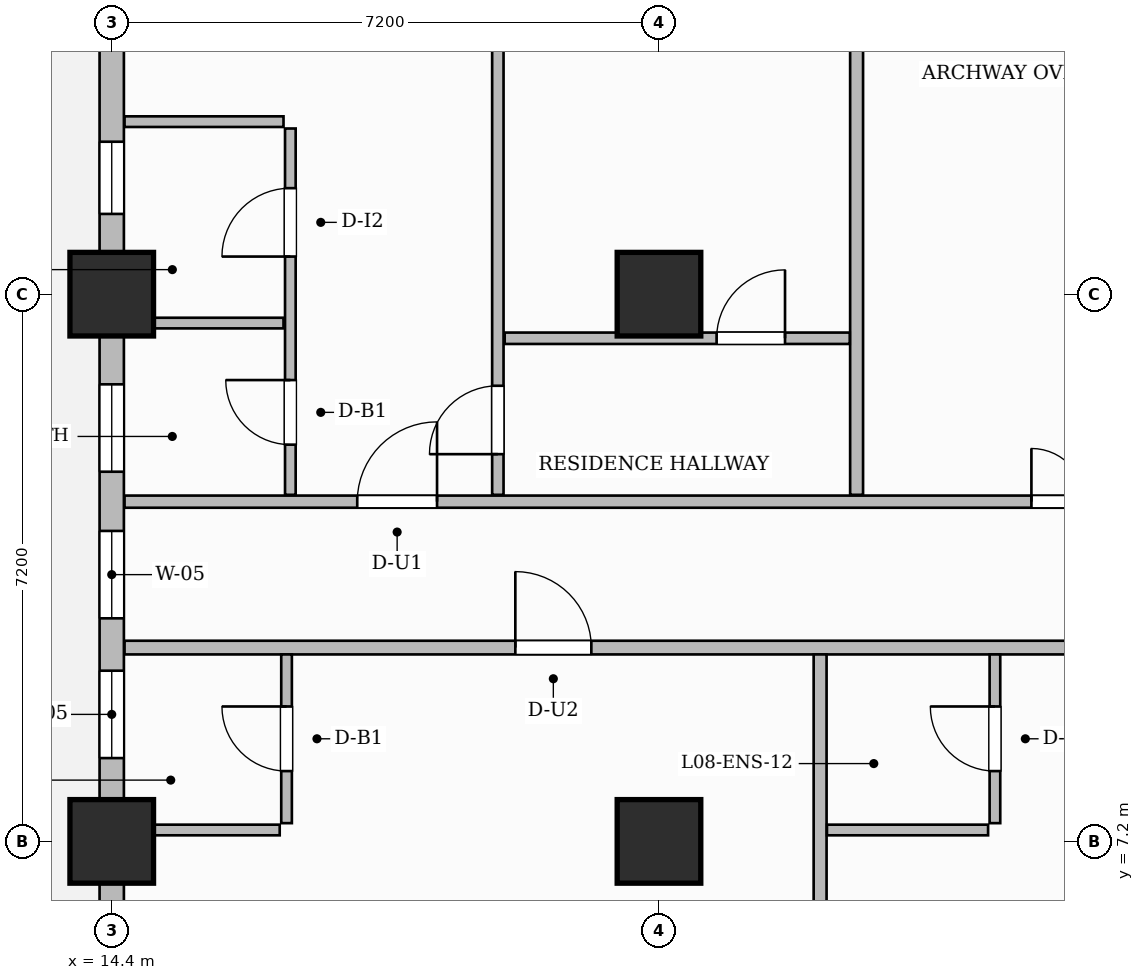
"""IFC4 building model, lengths in metres.
Left out: names, types, materials, properties, quantities, classifications, styles, units other than length and angle.
Written with IfcOpenShell. Run it as: python <this file> out.ifc"""

import sys

from ifc_helpers import new_model, si_unit, direction, frame, frame_2d, origin, origin_2d, place, context, subcontext, project, spatial, rectangle, extrude, source, transform, mapped, element, fill, save


model = new_model("IFC4")
c1 = context("Model", 3, precision=1e-05, world=origin(), true_north=direction((0.0, 1.0)))
c2 = subcontext(c1, "Body", "Model", "MODEL_VIEW")
j1 = project(units=[si_unit("LENGTHUNIT", "METRE"), si_unit("PLANEANGLEUNIT", "RADIAN")], contexts=[c1])
p1 = place(None, origin())
s1 = spatial("IfcSite", under=j1, at=p1, CompositionType="ELEMENT")
p2 = place(p1, origin())
s2 = spatial("IfcBuilding", under=s1, at=p2, CompositionType="ELEMENT")
p3 = place(p2, frame((0.0, 0.0, 39.8)))
s3 = spatial("IfcBuildingStorey", under=s2, at=p3, CompositionType="ELEMENT", Elevation=39.8)
m1 = source(origin(), c2, "Body", "SweptSolid", [
    extrude(rectangle(XDim=1.1, YDim=1.1, at=origin_2d()), origin(), (0.0, 0.0, 1.0), 3.7),
])
for number, where, z_axis, x_axis in (
    (1, (14.4, 7.2, 0.0), (0.0, 0.0, 1.0), (1.0, 0.0, 0.0)),
    (2, (14.4, 14.4, 0.0), (0.0, 0.0, 1.0), (1.0, 0.0, 0.0)),
    (3, (21.6, 7.2, 0.0), (0.0, 0.0, 1.0), (1.0, 0.0, 0.0)),
    (4, (21.6, 14.4, 0.0), (0.0, 0.0, 1.0), (1.0, 0.0, 0.0)),
):
    element("IfcColumn", number, at=place(p3, frame(where, z_axis=z_axis, x_axis=x_axis)), inside=s3, PredefinedType="COLUMN", context=c2, shape_type="MappedRepresentation", body=[
        mapped(m1, transform((0.0, 0.0, 0.0), scale=1.0)),
    ])
p4 = place(p3, frame((14.568, 9.75, 0.0), z_axis=(0.0, 0.0, 1.0), x_axis=(1.0, 0.0, 0.0)))
e5 = element("IfcWall", 5, at=p4, inside=s3, PredefinedType="PARTITIONING", context=c2, shape_type="SweptSolid", body=[
    extrude(rectangle(XDim=15.542, YDim=0.18, at=frame_2d((7.771, 0.0))), origin(), (0.0, 0.0, 1.0), 3.45),
])
p5 = place(p4, frame((5.142, 0.0, 0.0)))
e6 = element("IfcOpeningElement", 6, at=p5, cuts=e5, PredefinedType="OPENING", context=c2, shape_type="SweptSolid", body=[
    extrude(rectangle(XDim=1.0, YDim=2.2, at=frame_2d((0.5, 1.1))), frame((0.0, 0.1, 0.0), z_axis=(0.0, -1.0, 0.0), x_axis=(1.0, 0.0, 0.0)), (0.0, 0.0, 1.0), 0.2),
])
p6 = place(p4, frame((13.017, 0.0, 0.0)))
e7 = element("IfcOpeningElement", 7, at=p6, cuts=e5, PredefinedType="OPENING", context=c2, shape_type="SweptSolid", body=[
    extrude(rectangle(XDim=1.05, YDim=2.25, at=frame_2d((0.525, 1.125))), frame((0.0, 0.1, 0.0), z_axis=(0.0, -1.0, 0.0), x_axis=(1.0, 0.0, 0.0)), (0.0, 0.0, 1.0), 0.2),
])
p7 = place(p3, frame((14.568, 11.67, 0.0), z_axis=(0.0, 0.0, 1.0), x_axis=(1.0, 0.0, 0.0)))
e8 = element("IfcWall", 8, at=p7, inside=s3, PredefinedType="PARTITIONING", context=c2, shape_type="SweptSolid", body=[
    extrude(rectangle(XDim=15.542, YDim=0.16, at=frame_2d((7.771, 0.0))), origin(), (0.0, 0.0, 1.0), 3.45),
])
p8 = place(p7, frame((3.062, 0.0, 0.0)))
e9 = element("IfcOpeningElement", 9, at=p8, cuts=e8, PredefinedType="OPENING", context=c2, shape_type="SweptSolid", body=[
    extrude(rectangle(XDim=1.05, YDim=2.25, at=frame_2d((0.525, 1.125))), frame((0.0, 0.09, 0.0), z_axis=(0.0, -1.0, 0.0), x_axis=(1.0, 0.0, 0.0)), (0.0, 0.0, 1.0), 0.18),
])
p9 = place(p7, frame((11.932, 0.0, 0.0)))
e10 = element("IfcOpeningElement", 10, at=p9, cuts=e8, PredefinedType="OPENING", context=c2, shape_type="SweptSolid", body=[
    extrude(rectangle(XDim=1.4, YDim=2.35, at=frame_2d((0.7, 1.175))), frame((0.0, 0.09, 0.0), z_axis=(0.0, -1.0, 0.0), x_axis=(1.0, 0.0, 0.0)), (0.0, 0.0, 1.0), 0.18),
])
p10 = place(p3, frame((23.72, 0.168, 0.0), z_axis=(0.0, 0.0, 1.0), x_axis=(0.0, 1.0, 0.0)))
e11 = element("IfcWall", 11, at=p10, inside=s3, PredefinedType="PARTITIONING", context=c2, shape_type="SweptSolid", body=[
    extrude(rectangle(XDim=9.492, YDim=0.17, at=frame_2d((4.746, 0.0))), origin(), (0.0, 0.0, 1.0), 3.45),
])
p11 = place(p3, frame((16.7, 7.44, 0.0), z_axis=(0.0, 0.0, 1.0), x_axis=(0.0, 1.0, 0.0)))
e12 = element("IfcWall", 12, at=p11, inside=s3, PredefinedType="PARTITIONING", context=c2, shape_type="SweptSolid", body=[
    extrude(rectangle(XDim=2.22, YDim=0.14, at=frame_2d((1.11, 0.0))), origin(), (0.0, 0.0, 1.0), 3.45),
])
p12 = place(p11, frame((0.685, 0.0, 0.0)))
e13 = element("IfcOpeningElement", 13, at=p12, cuts=e12, PredefinedType="OPENING", context=c2, shape_type="SweptSolid", body=[
    extrude(rectangle(XDim=0.85, YDim=2.1, at=frame_2d((0.425, 1.05))), frame((0.0, 0.08, 0.0), z_axis=(0.0, -1.0, 0.0), x_axis=(1.0, 0.0, 0.0)), (0.0, 0.0, 1.0), 0.16),
])
p13 = place(p3, frame((14.49, 7.35, 0.0), z_axis=(0.0, 0.0, 1.0), x_axis=(1.0, 0.0, 0.0)))
e14 = element("IfcWall", 14, at=p13, inside=s3, PredefinedType="PARTITIONING", context=c2, shape_type="SweptSolid", body=[
    extrude(rectangle(XDim=2.12, YDim=0.14, at=frame_2d((1.06, 0.0))), origin(), (0.0, 0.0, 1.0), 2.885),
])
p14 = place(p3, frame((26.02, 7.44, 0.0), z_axis=(0.0, 0.0, 1.0), x_axis=(0.0, 1.0, 0.0)))
e15 = element("IfcWall", 15, at=p14, inside=s3, PredefinedType="PARTITIONING", context=c2, shape_type="SweptSolid", body=[
    extrude(rectangle(XDim=2.22, YDim=0.14, at=frame_2d((1.11, 0.0))), origin(), (0.0, 0.0, 1.0), 3.45),
])
p15 = place(p14, frame((0.685, 0.0, 0.0)))
e16 = element("IfcOpeningElement", 16, at=p15, cuts=e15, PredefinedType="OPENING", context=c2, shape_type="SweptSolid", body=[
    extrude(rectangle(XDim=0.85, YDim=2.1, at=frame_2d((0.425, 1.05))), frame((0.0, 0.08, 0.0), z_axis=(0.0, -1.0, 0.0), x_axis=(1.0, 0.0, 0.0)), (0.0, 0.0, 1.0), 0.16),
])
p16 = place(p3, frame((23.81, 7.35, 0.0), z_axis=(0.0, 0.0, 1.0), x_axis=(1.0, 0.0, 0.0)))
e17 = element("IfcWall", 17, at=p16, inside=s3, PredefinedType="PARTITIONING", context=c2, shape_type="SweptSolid", body=[
    extrude(rectangle(XDim=2.12, YDim=0.14, at=frame_2d((1.06, 0.0))), origin(), (0.0, 0.0, 1.0), 2.885),
])
p17 = place(p3, frame((24.2, 11.76, 0.0), z_axis=(0.0, 0.0, 1.0), x_axis=(0.0, 1.0, 0.0)))
e18 = element("IfcWall", 18, at=p17, inside=s3, PredefinedType="PARTITIONING", context=c2, shape_type="SweptSolid", body=[
    extrude(rectangle(XDim=9.672, YDim=0.17, at=frame_2d((4.836, 0.0))), origin(), (0.0, 0.0, 1.0), 3.45),
])
p18 = place(p3, frame((16.75, 11.76, 0.0), z_axis=(0.0, 0.0, 1.0), x_axis=(0.0, 1.0, 0.0)))
e19 = element("IfcWall", 19, at=p18, inside=s3, PredefinedType="PARTITIONING", context=c2, shape_type="SweptSolid", body=[
    extrude(rectangle(XDim=4.82, YDim=0.14, at=frame_2d((2.41, 0.0))), origin(), (0.0, 0.0, 1.0), 3.45),
])
p19 = place(p18, frame((0.66, 0.0, 0.0)))
e20 = element("IfcOpeningElement", 20, at=p19, cuts=e19, PredefinedType="OPENING", context=c2, shape_type="SweptSolid", body=[
    extrude(rectangle(XDim=0.85, YDim=2.1, at=frame_2d((0.425, 1.05))), frame((0.0, 0.08, 0.0), z_axis=(0.0, -1.0, 0.0), x_axis=(1.0, 0.0, 0.0)), (0.0, 0.0, 1.0), 0.16),
])
p20 = place(p18, frame((3.135, 0.0, 0.0)))
e21 = element("IfcOpeningElement", 21, at=p20, cuts=e19, PredefinedType="OPENING", context=c2, shape_type="SweptSolid", body=[
    extrude(rectangle(XDim=0.9, YDim=2.15, at=frame_2d((0.45, 1.075))), frame((0.0, 0.08, 0.0), z_axis=(0.0, -1.0, 0.0), x_axis=(1.0, 0.0, 0.0)), (0.0, 0.0, 1.0), 0.16),
])
p21 = place(p3, frame((14.59, 14.02, 0.0), z_axis=(0.0, 0.0, 1.0), x_axis=(1.0, 0.0, 0.0)))
e22 = element("IfcWall", 22, at=p21, inside=s3, PredefinedType="PARTITIONING", context=c2, shape_type="SweptSolid", body=[
    extrude(rectangle(XDim=2.07, YDim=0.14, at=frame_2d((1.035, 0.0))), origin(), (0.0, 0.0, 1.0), 3.45),
])
p22 = place(p3, frame((14.568, 16.67, 0.0), z_axis=(0.0, 0.0, 1.0), x_axis=(1.0, 0.0, 0.0)))
e23 = element("IfcWall", 23, at=p22, inside=s3, PredefinedType="PARTITIONING", context=c2, shape_type="SweptSolid", body=[
    extrude(rectangle(XDim=2.092, YDim=0.14, at=frame_2d((1.046, 0.0))), origin(), (0.0, 0.0, 1.0), 3.45),
])
p23 = place(p3, frame((19.48, 11.76, 0.0), z_axis=(0.0, 0.0, 1.0), x_axis=(0.0, 1.0, 0.0)))
e24 = element("IfcWall", 24, at=p23, inside=s3, PredefinedType="PARTITIONING", context=c2, shape_type="SweptSolid", body=[
    extrude(rectangle(XDim=9.672, YDim=0.15, at=frame_2d((4.836, 0.0))), origin(), (0.0, 0.0, 1.0), 3.45),
])
p24 = place(p23, frame((0.535, 0.0, 0.0)))
e25 = element("IfcOpeningElement", 25, at=p24, cuts=e24, PredefinedType="OPENING", context=c2, shape_type="SweptSolid", body=[
    extrude(rectangle(XDim=0.9, YDim=2.15, at=frame_2d((0.45, 1.075))), frame((0.0, 0.085, 0.0), z_axis=(0.0, -1.0, 0.0), x_axis=(1.0, 0.0, 0.0)), (0.0, 0.0, 1.0), 0.17),
])
p25 = place(p3, frame((19.57, 13.82, 0.0), z_axis=(0.0, 0.0, 1.0), x_axis=(1.0, 0.0, 0.0)))
e26 = element("IfcWall", 26, at=p25, inside=s3, PredefinedType="PARTITIONING", context=c2, shape_type="SweptSolid", body=[
    extrude(rectangle(XDim=4.54, YDim=0.15, at=frame_2d((2.27, 0.0))), origin(), (0.0, 0.0, 1.0), 3.45),
])
p26 = place(p25, frame((2.788, 0.0, 0.0)))
e27 = element("IfcOpeningElement", 27, at=p26, cuts=e26, PredefinedType="OPENING", context=c2, shape_type="SweptSolid", body=[
    extrude(rectangle(XDim=0.9, YDim=2.15, at=frame_2d((0.45, 1.075))), frame((0.0, 0.085, 0.0), z_axis=(0.0, -1.0, 0.0), x_axis=(1.0, 0.0, 0.0)), (0.0, 0.0, 1.0), 0.17),
])
p27 = place(p3, frame((14.4, 0.05, 0.0), z_axis=(0.0, 0.0, 1.0), x_axis=(0.0, 1.0, 0.0)))
e28 = element("IfcWall", 28, at=p27, inside=s3, PredefinedType="SOLIDWALL", context=c2, shape_type="SweptSolid", body=[
    extrude(rectangle(XDim=21.5, YDim=0.32, at=frame_2d((10.75, 0.0))), origin(), (0.0, 0.0, 1.0), 2.885),
])
p28 = place(p27, frame((1.275, 0.0, 0.8)))
e29 = element("IfcOpeningElement", 29, at=p28, cuts=e28, PredefinedType="OPENING", context=c2, shape_type="SweptSolid", body=[
    extrude(rectangle(XDim=1.8, YDim=1.85, at=frame_2d((0.9, 0.925))), frame((0.0, 0.17, 0.0), z_axis=(0.0, -1.0, 0.0), x_axis=(1.0, 0.0, 0.0)), (0.0, 0.0, 1.0), 0.34),
])
p29 = place(p27, frame((4.025, 0.0, 0.8)))
e30 = element("IfcOpeningElement", 30, at=p29, cuts=e28, PredefinedType="OPENING", context=c2, shape_type="SweptSolid", body=[
    extrude(rectangle(XDim=1.8, YDim=1.85, at=frame_2d((0.9, 0.925))), frame((0.0, 0.17, 0.0), z_axis=(0.0, -1.0, 0.0), x_axis=(1.0, 0.0, 0.0)), (0.0, 0.0, 1.0), 0.34),
])
p30 = place(p27, frame((8.246, 0.0, 0.8)))
e31 = element("IfcOpeningElement", 31, at=p30, cuts=e28, PredefinedType="OPENING", context=c2, shape_type="SweptSolid", body=[
    extrude(rectangle(XDim=1.15, YDim=1.8, at=frame_2d((0.575, 0.9))), frame((0.0, 0.17, 0.0), z_axis=(0.0, -1.0, 0.0), x_axis=(1.0, 0.0, 0.0)), (0.0, 0.0, 1.0), 0.34),
])
p31 = place(p27, frame((10.085, 0.0, 0.8)))
e32 = element("IfcOpeningElement", 32, at=p31, cuts=e28, PredefinedType="OPENING", context=c2, shape_type="SweptSolid", body=[
    extrude(rectangle(XDim=1.15, YDim=1.8, at=frame_2d((0.575, 0.9))), frame((0.0, 0.17, 0.0), z_axis=(0.0, -1.0, 0.0), x_axis=(1.0, 0.0, 0.0)), (0.0, 0.0, 1.0), 0.34),
])
p32 = place(p27, frame((12.014, 0.0, 0.8)))
e33 = element("IfcOpeningElement", 33, at=p32, cuts=e28, PredefinedType="OPENING", context=c2, shape_type="SweptSolid", body=[
    extrude(rectangle(XDim=1.15, YDim=1.8, at=frame_2d((0.575, 0.9))), frame((0.0, 0.17, 0.0), z_axis=(0.0, -1.0, 0.0), x_axis=(1.0, 0.0, 0.0)), (0.0, 0.0, 1.0), 0.34),
])
p33 = place(p27, frame((15.406, 0.0, 0.8)))
e34 = element("IfcOpeningElement", 34, at=p33, cuts=e28, PredefinedType="OPENING", context=c2, shape_type="SweptSolid", body=[
    extrude(rectangle(XDim=0.95, YDim=1.75, at=frame_2d((0.475, 0.875))), frame((0.0, 0.17, 0.0), z_axis=(0.0, -1.0, 0.0), x_axis=(1.0, 0.0, 0.0)), (0.0, 0.0, 1.0), 0.34),
])
p34 = place(p27, frame((17.789, 0.0, 0.8)))
e35 = element("IfcOpeningElement", 35, at=p34, cuts=e28, PredefinedType="OPENING", context=c2, shape_type="SweptSolid", body=[
    extrude(rectangle(XDim=1.8, YDim=1.85, at=frame_2d((0.9, 0.925))), frame((0.0, 0.17, 0.0), z_axis=(0.0, -1.0, 0.0), x_axis=(1.0, 0.0, 0.0)), (0.0, 0.0, 1.0), 0.34),
])
m2 = source(origin(), c2, "Body", "SweptSolid", [
    extrude(rectangle(XDim=0.85, YDim=2.1, at=frame_2d((0.425, 1.05))), frame((0.0, 0.025, 0.0), z_axis=(0.0, -1.0, 0.0), x_axis=(1.0, 0.0, 0.0)), (0.0, 0.0, 1.0), 0.05),
])
p35 = place(p12, origin())
e36 = element("IfcDoor", 36, at=p35, inside=s3, OperationType="SINGLE_SWING_RIGHT", PredefinedType="DOOR", context=c2, shape_type="MappedRepresentation", body=[
    mapped(m2, transform((0.0, 0.0, 0.0), scale=1.0)),
])
fill(e13, e36)
m3 = source(origin(), c2, "Body", "SweptSolid", [
    extrude(rectangle(XDim=1.0, YDim=2.2, at=frame_2d((0.5, 1.1))), frame((0.0, 0.025, 0.0), z_axis=(0.0, -1.0, 0.0), x_axis=(1.0, 0.0, 0.0)), (0.0, 0.0, 1.0), 0.05),
])
p36 = place(p5, origin())
e37 = element("IfcDoor", 37, at=p36, inside=s3, OperationType="SINGLE_SWING_LEFT", PredefinedType="DOOR", context=c2, shape_type="MappedRepresentation", body=[
    mapped(m3, transform((0.0, 0.0, 0.0), scale=1.0)),
])
fill(e6, e37)
p37 = place(p15, origin())
e38 = element("IfcDoor", 38, at=p37, inside=s3, OperationType="SINGLE_SWING_RIGHT", PredefinedType="DOOR", context=c2, shape_type="MappedRepresentation", body=[
    mapped(m2, transform((0.0, 0.0, 0.0), scale=1.0)),
])
fill(e16, e38)
p38 = place(p19, origin())
e39 = element("IfcDoor", 39, at=p38, inside=s3, OperationType="SINGLE_SWING_RIGHT", PredefinedType="DOOR", context=c2, shape_type="MappedRepresentation", body=[
    mapped(m2, transform((0.0, 0.0, 0.0), scale=1.0)),
])
fill(e20, e39)
m4 = source(origin(), c2, "Body", "SweptSolid", [
    extrude(rectangle(XDim=0.9, YDim=2.15, at=frame_2d((0.45, 1.075))), frame((0.0, 0.025, 0.0), z_axis=(0.0, -1.0, 0.0), x_axis=(1.0, 0.0, 0.0)), (0.0, 0.0, 1.0), 0.05),
])
p39 = place(p20, origin())
e40 = element("IfcDoor", 40, at=p39, inside=s3, OperationType="SINGLE_SWING_LEFT", PredefinedType="DOOR", context=c2, shape_type="MappedRepresentation", body=[
    mapped(m4, transform((0.0, 0.0, 0.0), scale=1.0)),
])
fill(e21, e40)
m5 = source(origin(), c2, "Body", "SweptSolid", [
    extrude(rectangle(XDim=1.05, YDim=2.25, at=frame_2d((0.525, 1.125))), frame((0.0, 0.025, 0.0), z_axis=(0.0, -1.0, 0.0), x_axis=(1.0, 0.0, 0.0)), (0.0, 0.0, 1.0), 0.05),
])
p40 = place(p8, origin())
e41 = element("IfcDoor", 41, at=p40, inside=s3, OperationType="SINGLE_SWING_RIGHT", PredefinedType="DOOR", context=c2, shape_type="MappedRepresentation", body=[
    mapped(m5, transform((0.0, 0.0, 0.0), scale=1.0)),
])
fill(e9, e41)
p41 = place(p24, origin())
e42 = element("IfcDoor", 42, at=p41, inside=s3, OperationType="SINGLE_SWING_LEFT", PredefinedType="DOOR", context=c2, shape_type="MappedRepresentation", body=[
    mapped(m4, transform((0.0, 0.0, 0.0), scale=1.0)),
])
fill(e25, e42)
p42 = place(p26, origin())
e43 = element("IfcDoor", 43, at=p42, inside=s3, OperationType="SINGLE_SWING_RIGHT", PredefinedType="DOOR", context=c2, shape_type="MappedRepresentation", body=[
    mapped(m4, transform((0.0, 0.0, 0.0), scale=1.0)),
])
fill(e27, e43)
m6 = source(origin(), c2, "Body", "SweptSolid", [
    extrude(rectangle(XDim=1.4, YDim=2.35, at=frame_2d((0.7, 1.175))), frame((0.0, 0.025, 0.0), z_axis=(0.0, -1.0, 0.0), x_axis=(1.0, 0.0, 0.0)), (0.0, 0.0, 1.0), 0.05),
])
p43 = place(p9, origin())
e44 = element("IfcDoor", 44, at=p43, inside=s3, OperationType="DOUBLE_DOOR_SINGLE_SWING", PredefinedType="DOOR", context=c2, shape_type="MappedRepresentation", body=[
    mapped(m6, transform((0.0, 0.0, 0.0), scale=1.0)),
])
fill(e10, e44)
m7 = source(origin(), c2, "Body", "SweptSolid", [
    extrude(rectangle(XDim=1.15, YDim=1.8, at=frame_2d((0.575, 0.9))), frame((0.0, 0.03, 0.0), z_axis=(0.0, -1.0, 0.0), x_axis=(1.0, 0.0, 0.0)), (0.0, 0.0, 1.0), 0.06),
])
p44 = place(p30, origin())
e45 = element("IfcWindow", 45, at=p44, inside=s3, PartitioningType="SINGLE_PANEL", PredefinedType="WINDOW", context=c2, shape_type="MappedRepresentation", body=[
    mapped(m7, transform((0.0, 0.0, 0.0), scale=1.0)),
])
fill(e31, e45)
p45 = place(p31, origin())
e46 = element("IfcWindow", 46, at=p45, inside=s3, PartitioningType="SINGLE_PANEL", PredefinedType="WINDOW", context=c2, shape_type="MappedRepresentation", body=[
    mapped(m7, transform((0.0, 0.0, 0.0), scale=1.0)),
])
fill(e32, e46)
p46 = place(p32, origin())
e47 = element("IfcWindow", 47, at=p46, inside=s3, PartitioningType="SINGLE_PANEL", PredefinedType="WINDOW", context=c2, shape_type="MappedRepresentation", body=[
    mapped(m7, transform((0.0, 0.0, 0.0), scale=1.0)),
])
fill(e33, e47)
m8 = source(origin(), c2, "Body", "SweptSolid", [
    extrude(rectangle(XDim=0.95, YDim=1.75, at=frame_2d((0.475, 0.875))), frame((0.0, 0.03, 0.0), z_axis=(0.0, -1.0, 0.0), x_axis=(1.0, 0.0, 0.0)), (0.0, 0.0, 1.0), 0.06),
])
p47 = place(p33, origin())
e48 = element("IfcWindow", 48, at=p47, inside=s3, PartitioningType="SINGLE_PANEL", PredefinedType="WINDOW", context=c2, shape_type="MappedRepresentation", body=[
    mapped(m8, transform((0.0, 0.0, 0.0), scale=1.0)),
])
fill(e34, e48)
save(model, sys.argv[1])
